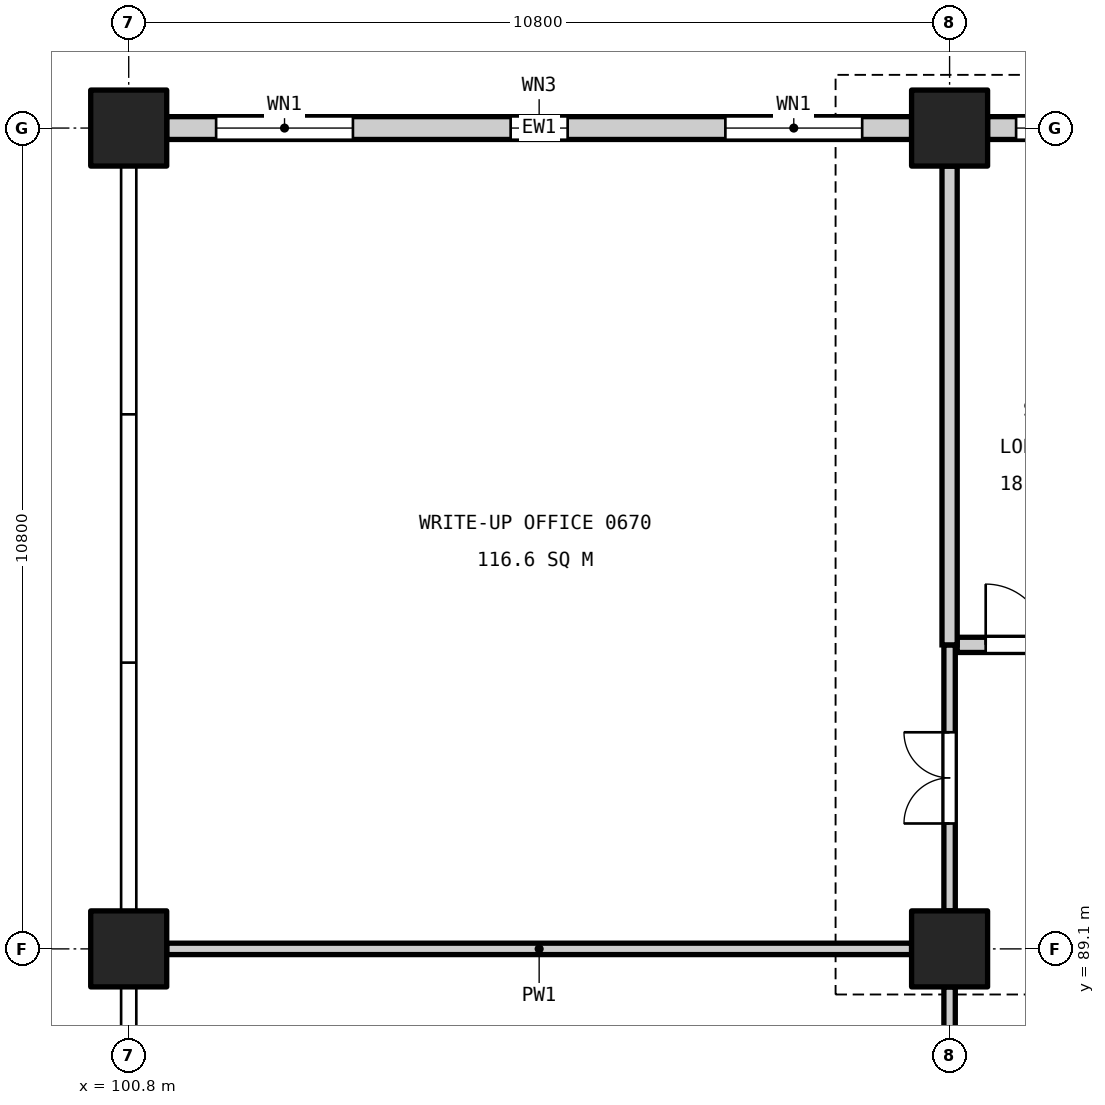
"""IFC4 building model, lengths in metres.
Left out: names, types, materials, properties, quantities, classifications, styles, units other than length and angle.
Written with IfcOpenShell. Run it as: python <this file> out.ifc"""

import sys

from ifc_helpers import new_model, si_unit, direction, frame, frame_2d, origin, origin_2d, place, context, subcontext, project, spatial, rectangle, extrude, element, fill, save


model = new_model("IFC4")
c1 = context("Model", 3, precision=1e-05, world=origin(), true_north=direction((0.0, 1.0)))
c2 = subcontext(c1, "Body", "Model", "MODEL_VIEW")
j1 = project(units=[si_unit("LENGTHUNIT", "METRE"), si_unit("PLANEANGLEUNIT", "RADIAN")], contexts=[c1])
p1 = place(None, origin())
s1 = spatial("IfcSite", under=j1, at=p1, CompositionType="ELEMENT")
p2 = place(p1, origin())
s2 = spatial("IfcBuilding", under=s1, at=p2, CompositionType="ELEMENT")
p3 = place(p2, frame((0.0, 0.0, 31.8)))
s3 = spatial("IfcBuildingStorey", under=s2, at=p3, CompositionType="ELEMENT", Elevation=31.8)
for number, where, z_axis, x_axis in (
    (1, (111.6, 89.1, 0.0), (0.0, 0.0, 1.0), (1.0, 0.0, 0.0)),
    (2, (111.6, 99.9, 0.0), (0.0, 0.0, 1.0), (1.0, 0.0, 0.0)),
    (3, (100.8, 89.1, 0.0), (0.0, 0.0, 1.0), (1.0, 0.0, 0.0)),
    (4, (100.8, 99.9, 0.0), (0.0, 0.0, 1.0), (1.0, 0.0, 0.0)),
):
    element("IfcColumn", number, at=place(p3, frame(where, z_axis=z_axis, x_axis=x_axis)), inside=s3, PredefinedType="COLUMN", context=c2, shape_type="SweptSolid", body=[
        extrude(rectangle(XDim=1.0, YDim=1.0, at=origin_2d()), origin(), (0.0, 0.0, 1.0), 4.8),
    ])
p4 = place(p3, frame((114.05, 99.9, 0.0), z_axis=(0.0, 0.0, 1.0), x_axis=(-1.0, 0.0, 0.0)))
e5 = element("IfcWall", 5, at=p4, inside=s3, PredefinedType="STANDARD", context=c2, shape_type="SweptSolid", body=[
    extrude(rectangle(XDim=1.95, YDim=0.3, at=frame_2d((0.975, 0.0))), origin(), (0.0, 0.0, 1.0), 3.85),
])
p5 = place(p4, frame((0.375, 0.0, 0.9)))
e6 = element("IfcOpeningElement", 6, at=p5, cuts=e5, PredefinedType="OPENING", context=c2, shape_type="SweptSolid", body=[
    extrude(rectangle(XDim=1.2, YDim=2.4, at=frame_2d((0.6, 1.2))), frame((0.0, 0.16, 0.0), z_axis=(0.0, -1.0, 0.0), x_axis=(1.0, 0.0, 0.0)), (0.0, 0.0, 1.0), 0.32),
])
p6 = place(p3, frame((111.1, 99.9, 0.0), z_axis=(0.0, 0.0, 1.0), x_axis=(-1.0, 0.0, 0.0)))
e7 = element("IfcWall", 7, at=p6, inside=s3, PredefinedType="STANDARD", context=c2, shape_type="SweptSolid", body=[
    extrude(rectangle(XDim=9.8, YDim=0.3, at=frame_2d((4.9, 0.0))), origin(), (0.0, 0.0, 1.0), 3.85),
])
p7 = place(p6, frame((0.65, 0.0, 0.9)))
e8 = element("IfcOpeningElement", 8, at=p7, cuts=e7, PredefinedType="OPENING", context=c2, shape_type="SweptSolid", body=[
    extrude(rectangle(XDim=1.8, YDim=2.4, at=frame_2d((0.9, 1.2))), frame((0.0, 0.16, 0.0), z_axis=(0.0, -1.0, 0.0), x_axis=(1.0, 0.0, 0.0)), (0.0, 0.0, 1.0), 0.32),
])
p8 = place(p6, frame((4.525, 0.0, 0.8)))
e9 = element("IfcOpeningElement", 9, at=p8, cuts=e7, PredefinedType="OPENING", context=c2, shape_type="SweptSolid", body=[
    extrude(rectangle(XDim=0.75, YDim=1.2, at=frame_2d((0.375, 0.6))), frame((0.0, 0.16, 0.0), z_axis=(0.0, -1.0, 0.0), x_axis=(1.0, 0.0, 0.0)), (0.0, 0.0, 1.0), 0.32),
])
p9 = place(p6, frame((7.35, 0.0, 0.9)))
e10 = element("IfcOpeningElement", 10, at=p9, cuts=e7, PredefinedType="OPENING", context=c2, shape_type="SweptSolid", body=[
    extrude(rectangle(XDim=1.8, YDim=2.4, at=frame_2d((0.9, 1.2))), frame((0.0, 0.16, 0.0), z_axis=(0.0, -1.0, 0.0), x_axis=(1.0, 0.0, 0.0)), (0.0, 0.0, 1.0), 0.32),
])
p10 = place(p3, frame((114.05, 93.1, 0.0), z_axis=(0.0, 0.0, 1.0), x_axis=(-1.0, 0.0, 0.0)))
e11 = element("IfcWall", 11, at=p10, inside=s3, PredefinedType="PARTITIONING", context=c2, shape_type="SweptSolid", body=[
    extrude(rectangle(XDim=2.35, YDim=0.2, at=frame_2d((1.175, 0.0))), origin(), (0.0, 0.0, 1.0), 3.55),
])
p11 = place(p10, frame((0.375, 0.0, 0.0)))
e12 = element("IfcOpeningElement", 12, at=p11, cuts=e11, PredefinedType="OPENING", context=c2, shape_type="SweptSolid", body=[
    extrude(rectangle(XDim=1.6, YDim=2.1, at=frame_2d((0.8, 1.05))), frame((0.0, 0.11, 0.0), z_axis=(0.0, -1.0, 0.0), x_axis=(1.0, 0.0, 0.0)), (0.0, 0.0, 1.0), 0.22),
])
p12 = place(p3, frame((111.6, 78.8, 0.0), z_axis=(0.0, 0.0, 1.0), x_axis=(0.0, 1.0, 0.0)))
e13 = element("IfcWall", 13, at=p12, inside=s3, PredefinedType="PARTITIONING", context=c2, shape_type="SweptSolid", body=[
    extrude(rectangle(XDim=9.8, YDim=0.15, at=frame_2d((4.9, 0.0))), origin(), (0.0, 0.0, 1.0), 3.55),
])
p13 = place(p12, frame((4.3, 0.0, 0.0)))
e14 = element("IfcOpeningElement", 14, at=p13, cuts=e13, PredefinedType="OPENING", context=c2, shape_type="SweptSolid", body=[
    extrude(rectangle(XDim=1.2, YDim=2.1, at=frame_2d((0.6, 1.05))), frame((0.0, 0.085, 0.0), z_axis=(0.0, -1.0, 0.0), x_axis=(1.0, 0.0, 0.0)), (0.0, 0.0, 1.0), 0.17),
])
p14 = place(p3, frame((111.6, 89.6, 0.0), z_axis=(0.0, 0.0, 1.0), x_axis=(0.0, 1.0, 0.0)))
e15 = element("IfcWall", 15, at=p14, inside=s3, PredefinedType="PARTITIONING", context=c2, shape_type="SweptSolid", body=[
    extrude(rectangle(XDim=3.5, YDim=0.15, at=frame_2d((1.75, 0.0))), origin(), (0.0, 0.0, 1.0), 3.55),
])
p15 = place(p14, frame((1.15, 0.0, 0.0)))
e16 = element("IfcOpeningElement", 16, at=p15, cuts=e15, PredefinedType="OPENING", context=c2, shape_type="SweptSolid", body=[
    extrude(rectangle(XDim=1.2, YDim=2.1, at=frame_2d((0.6, 1.05))), frame((0.0, 0.085, 0.0), z_axis=(0.0, -1.0, 0.0), x_axis=(1.0, 0.0, 0.0)), (0.0, 0.0, 1.0), 0.17),
])
p16 = place(p3, frame((111.6, 93.1, 0.0), z_axis=(0.0, 0.0, 1.0), x_axis=(0.0, 1.0, 0.0)))
e17 = element("IfcWall", 17, at=p16, inside=s3, PredefinedType="PARTITIONING", context=c2, shape_type="SweptSolid", body=[
    extrude(rectangle(XDim=6.3, YDim=0.2, at=frame_2d((3.15, 0.0))), origin(), (0.0, 0.0, 1.0), 3.55),
])
p17 = place(p3, frame((111.1, 89.1, 0.0), z_axis=(0.0, 0.0, 1.0), x_axis=(-1.0, 0.0, 0.0)))
e18 = element("IfcWall", 18, at=p17, inside=s3, PredefinedType="PARTITIONING", context=c2, shape_type="SweptSolid", body=[
    extrude(rectangle(XDim=9.8, YDim=0.15, at=frame_2d((4.9, 0.0))), origin(), (0.0, 0.0, 1.0), 3.85),
])
p18 = place(p5, origin())
e19 = element("IfcWindow", 19, at=p18, inside=s3, PartitioningType="SINGLE_PANEL", PredefinedType="WINDOW", context=c2, shape_type="SweptSolid", body=[
    extrude(rectangle(XDim=1.2, YDim=2.4, at=frame_2d((0.6, 1.2))), frame((0.0, 0.03, 0.0), z_axis=(0.0, -1.0, 0.0), x_axis=(1.0, 0.0, 0.0)), (0.0, 0.0, 1.0), 0.06),
])
fill(e6, e19)
p19 = place(p7, origin())
e20 = element("IfcWindow", 20, at=p19, inside=s3, PartitioningType="SINGLE_PANEL", PredefinedType="WINDOW", context=c2, shape_type="SweptSolid", body=[
    extrude(rectangle(XDim=1.8, YDim=2.4, at=frame_2d((0.9, 1.2))), frame((0.0, 0.03, 0.0), z_axis=(0.0, -1.0, 0.0), x_axis=(1.0, 0.0, 0.0)), (0.0, 0.0, 1.0), 0.06),
])
fill(e8, e20)
p20 = place(p8, origin())
e21 = element("IfcWindow", 21, at=p20, inside=s3, PartitioningType="SINGLE_PANEL", PredefinedType="WINDOW", context=c2, shape_type="SweptSolid", body=[
    extrude(rectangle(XDim=0.75, YDim=1.2, at=frame_2d((0.375, 0.6))), frame((0.0, 0.03, 0.0), z_axis=(0.0, -1.0, 0.0), x_axis=(1.0, 0.0, 0.0)), (0.0, 0.0, 1.0), 0.06),
])
fill(e9, e21)
p21 = place(p9, origin())
e22 = element("IfcWindow", 22, at=p21, inside=s3, PartitioningType="SINGLE_PANEL", PredefinedType="WINDOW", context=c2, shape_type="SweptSolid", body=[
    extrude(rectangle(XDim=1.8, YDim=2.4, at=frame_2d((0.9, 1.2))), frame((0.0, 0.03, 0.0), z_axis=(0.0, -1.0, 0.0), x_axis=(1.0, 0.0, 0.0)), (0.0, 0.0, 1.0), 0.06),
])
fill(e10, e22)
p22 = place(p15, origin())
e23 = element("IfcDoor", 23, at=p22, inside=s3, OperationType="DOUBLE_DOOR_SINGLE_SWING", PredefinedType="DOOR", context=c2, shape_type="SweptSolid", body=[
    extrude(rectangle(XDim=1.2, YDim=2.1, at=frame_2d((0.6, 1.05))), frame((0.0, 0.025, 0.0), z_axis=(0.0, -1.0, 0.0), x_axis=(1.0, 0.0, 0.0)), (0.0, 0.0, 1.0), 0.05),
])
fill(e16, e23)
p23 = place(p11, frame((1.6, 0.0, 0.0), z_axis=(0.0, 0.0, 1.0), x_axis=(-1.0, 0.0, 0.0)))
e24 = element("IfcDoor", 24, at=p23, inside=s3, OperationType="DOUBLE_DOOR_SINGLE_SWING", PredefinedType="DOOR", context=c2, shape_type="SweptSolid", body=[
    extrude(rectangle(XDim=1.6, YDim=2.1, at=frame_2d((0.8, 1.05))), frame((0.0, 0.025, 0.0), z_axis=(0.0, -1.0, 0.0), x_axis=(1.0, 0.0, 0.0)), (0.0, 0.0, 1.0), 0.05),
])
fill(e12, e24)
save(model, sys.argv[1])
